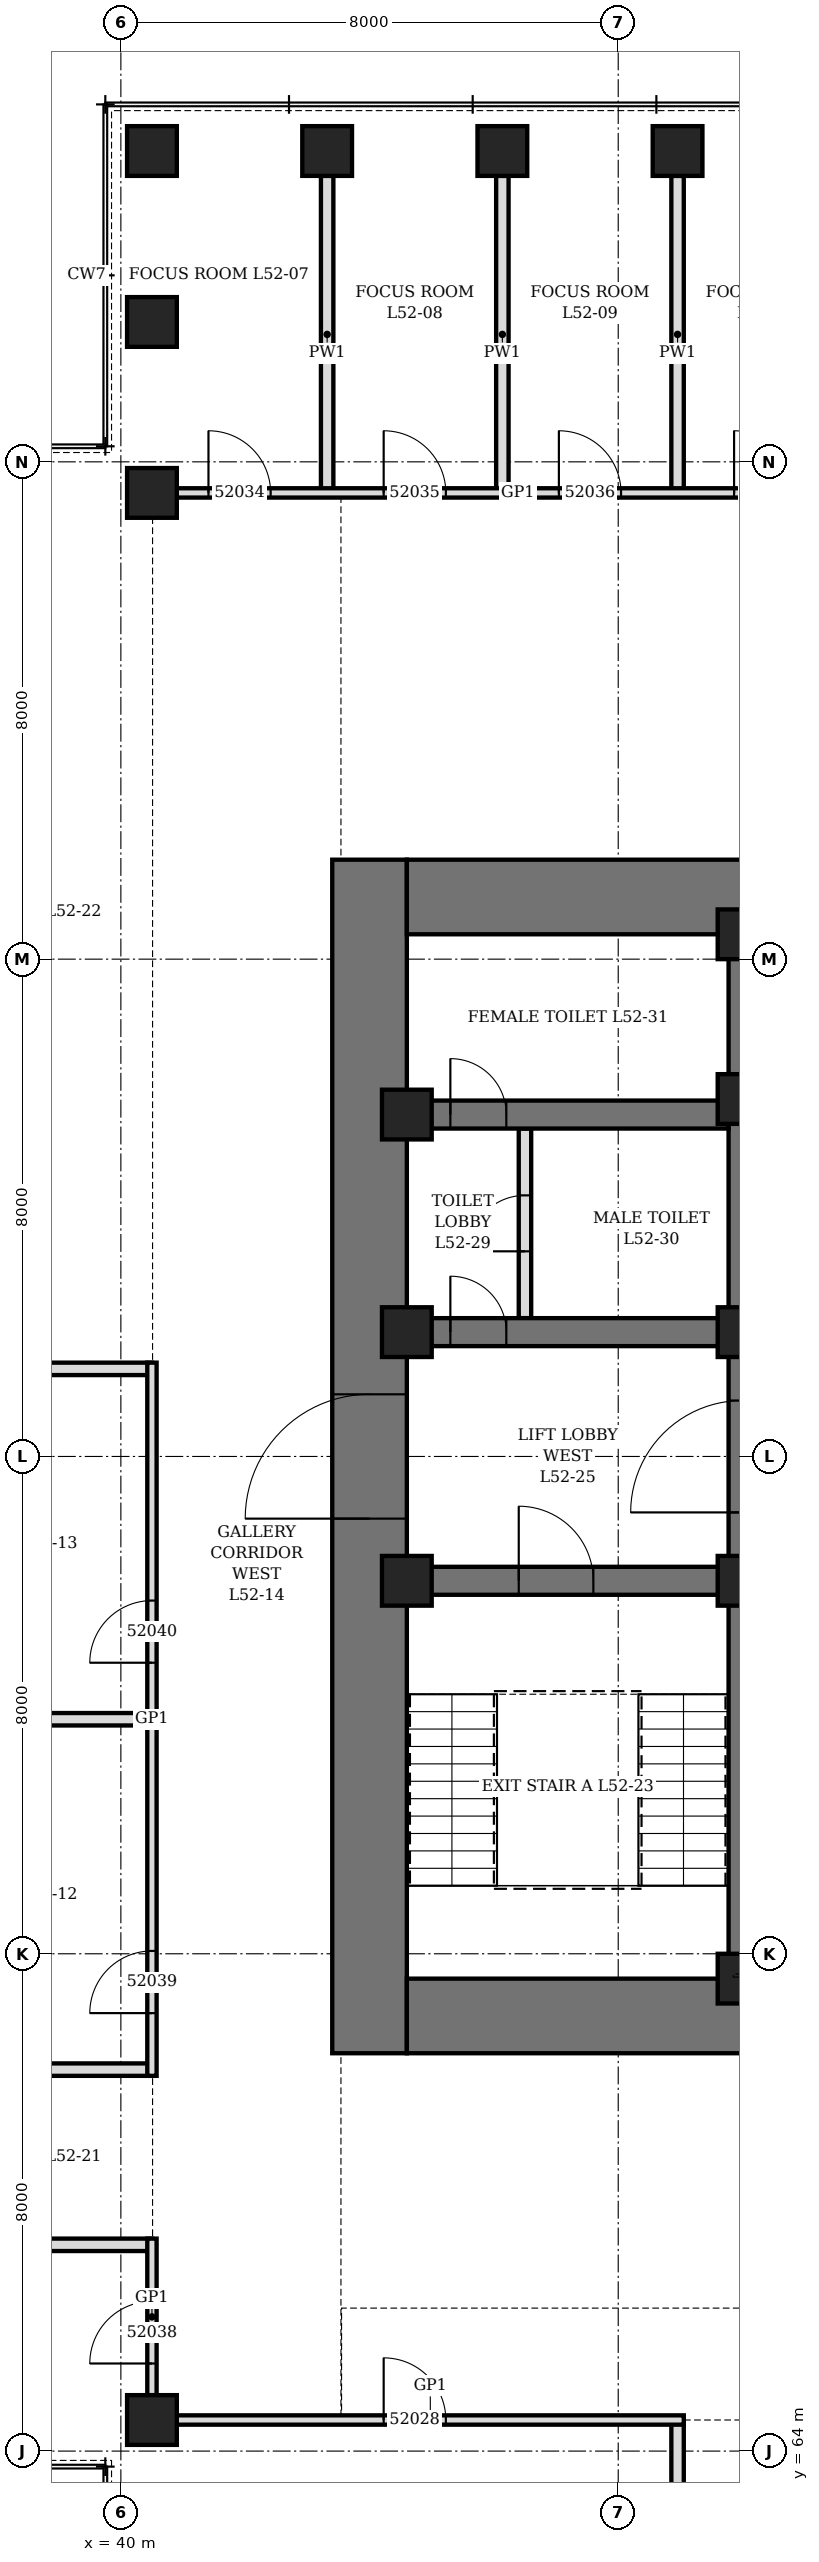
"""IFC4 building model, lengths in metres.
Left out: names, types, materials, properties, quantities, classifications, styles, units other than length and angle.
Written with IfcOpenShell. Run it as: python <this file> out.ifc"""

import sys

from ifc_helpers import new_model, si_unit, direction, frame, frame_2d, origin, origin_2d, place, context, subcontext, project, spatial, rectangle, hollow_rectangle, extrude, element, fill, save


model = new_model("IFC4")
c1 = context("Model", 3, precision=1e-05, world=origin(), true_north=direction((0.0, 1.0)))
c2 = subcontext(c1, "Body", "Model", "MODEL_VIEW")
j1 = project(units=[si_unit("LENGTHUNIT", "METRE"), si_unit("PLANEANGLEUNIT", "RADIAN")], contexts=[c1])
p1 = place(None, origin())
s1 = spatial("IfcSite", under=j1, at=p1, CompositionType="ELEMENT")
p2 = place(p1, origin())
s2 = spatial("IfcBuilding", under=s1, at=p2, CompositionType="ELEMENT")
p3 = place(p2, frame((0.0, 0.0, 231.7)))
s3 = spatial("IfcBuildingStorey", under=s2, at=p3, CompositionType="ELEMENT", Elevation=231.7)
for number, where, z_axis, x_axis in (
    (1, (48.955, 101.0, 0.0), (0.0, 0.0, 1.0), (1.0, 0.0, 0.0)),
    (2, (46.136, 101.0, 0.0), (0.0, 0.0, 1.0), (1.0, 0.0, 0.0)),
    (3, (43.318, 101.0, 0.0), (0.0, 0.0, 1.0), (1.0, 0.0, 0.0)),
    (4, (40.5, 101.0, 0.0), (0.0, 0.0, 1.0), (0.0, 1.0, 0.0)),
    (5, (40.5, 98.25, 0.0), (0.0, 0.0, 1.0), (0.0, 1.0, 0.0)),
    (6, (40.5, 95.5, 0.0), (0.0, 0.0, 1.0), (1.0, 0.0, 0.0)),
    (7, (40.5, 64.5, 0.0), (0.0, 0.0, 1.0), (0.0, 1.0, 0.0)),
):
    element("IfcColumn", number, at=place(p3, frame(where, z_axis=z_axis, x_axis=x_axis)), inside=s3, PredefinedType="COLUMN", context=c2, shape_type="SweptSolid", body=[
        extrude(hollow_rectangle(XDim=0.8, YDim=0.8, WallThickness=0.08, at=origin_2d()), origin(), (0.0, 0.0, 1.0), 4.2),
    ])
p4 = place(p3, frame((44.0, 70.4, 0.0), z_axis=(0.0, 0.0, 1.0), x_axis=(0.0, 1.0, 0.0)))
e8 = element("IfcWall", 8, at=p4, inside=s3, PredefinedType="SHEAR", context=c2, shape_type="SweptSolid", body=[
    extrude(rectangle(XDim=19.2, YDim=1.2, at=frame_2d((9.6, 0.0))), origin(), (0.0, 0.0, 1.0), 4.2),
])
p5 = place(p4, frame((8.6, 0.0, 0.0)))
e9 = element("IfcOpeningElement", 9, at=p5, cuts=e8, PredefinedType="OPENING", context=c2, shape_type="SweptSolid", body=[
    extrude(rectangle(XDim=2.0, YDim=2.4, at=frame_2d((1.0, 1.2))), frame((0.0, 0.61, 0.0), z_axis=(0.0, -1.0, 0.0), x_axis=(1.0, 0.0, 0.0)), (0.0, 0.0, 1.0), 1.22),
])
p6 = place(p3, frame((44.6, 71.0, 0.0), z_axis=(0.0, 0.0, 1.0), x_axis=(1.0, 0.0, 0.0)))
e10 = element("IfcWall", 10, at=p6, inside=s3, PredefinedType="SHEAR", context=c2, shape_type="SweptSolid", body=[
    extrude(rectangle(XDim=22.8, YDim=1.2, at=frame_2d((11.4, 0.0))), origin(), (0.0, 0.0, 1.0), 4.2),
])
p7 = place(p6, frame((6.35, 0.0, 0.0)))
e11 = element("IfcOpeningElement", 11, at=p7, cuts=e10, PredefinedType="OPENING", context=c2, shape_type="SweptSolid", body=[
    extrude(rectangle(XDim=1.1, YDim=2.2, at=frame_2d((0.55, 1.1))), frame((0.0, 0.61, 0.0), z_axis=(0.0, -1.0, 0.0), x_axis=(1.0, 0.0, 0.0)), (0.0, 0.0, 1.0), 1.22),
])
p8 = place(p6, frame((9.35, 0.0, 0.0)))
e12 = element("IfcOpeningElement", 12, at=p8, cuts=e10, PredefinedType="OPENING", context=c2, shape_type="SweptSolid", body=[
    extrude(rectangle(XDim=1.1, YDim=2.2, at=frame_2d((0.55, 1.1))), frame((0.0, 0.61, 0.0), z_axis=(0.0, -1.0, 0.0), x_axis=(1.0, 0.0, 0.0)), (0.0, 0.0, 1.0), 1.22),
])
p9 = place(p6, frame((12.35, 0.0, 0.0)))
e13 = element("IfcOpeningElement", 13, at=p9, cuts=e10, PredefinedType="OPENING", context=c2, shape_type="SweptSolid", body=[
    extrude(rectangle(XDim=1.1, YDim=2.2, at=frame_2d((0.55, 1.1))), frame((0.0, 0.61, 0.0), z_axis=(0.0, -1.0, 0.0), x_axis=(1.0, 0.0, 0.0)), (0.0, 0.0, 1.0), 1.22),
])
p10 = place(p6, frame((15.35, 0.0, 0.0)))
e14 = element("IfcOpeningElement", 14, at=p10, cuts=e10, PredefinedType="OPENING", context=c2, shape_type="SweptSolid", body=[
    extrude(rectangle(XDim=1.1, YDim=2.2, at=frame_2d((0.55, 1.1))), frame((0.0, 0.61, 0.0), z_axis=(0.0, -1.0, 0.0), x_axis=(1.0, 0.0, 0.0)), (0.0, 0.0, 1.0), 1.22),
])
p11 = place(p3, frame((44.6, 89.0, 0.0), z_axis=(0.0, 0.0, 1.0), x_axis=(1.0, 0.0, 0.0)))
e15 = element("IfcWall", 15, at=p11, inside=s3, PredefinedType="SHEAR", context=c2, shape_type="SweptSolid", body=[
    extrude(rectangle(XDim=22.8, YDim=1.2, at=frame_2d((11.4, 0.0))), origin(), (0.0, 0.0, 1.0), 4.2),
])
p12 = place(p11, frame((7.9, 0.0, 0.0)))
e16 = element("IfcOpeningElement", 16, at=p12, cuts=e15, PredefinedType="OPENING", context=c2, shape_type="SweptSolid", body=[
    extrude(rectangle(XDim=1.0, YDim=2.1, at=frame_2d((0.5, 1.05))), frame((0.0, 0.61, 0.0), z_axis=(0.0, -1.0, 0.0), x_axis=(1.0, 0.0, 0.0)), (0.0, 0.0, 1.0), 1.22),
])
p13 = place(p11, frame((13.012, 0.0, 0.0)))
e17 = element("IfcOpeningElement", 17, at=p13, cuts=e15, PredefinedType="OPENING", context=c2, shape_type="SweptSolid", body=[
    extrude(rectangle(XDim=0.9, YDim=2.1, at=frame_2d((0.45, 1.05))), frame((0.0, 0.61, 0.0), z_axis=(0.0, -1.0, 0.0), x_axis=(1.0, 0.0, 0.0)), (0.0, 0.0, 1.0), 1.22),
])
p14 = place(p3, frame((50.0, 71.6, 0.0), z_axis=(0.0, 0.0, 1.0), x_axis=(0.0, 1.0, 0.0)))
e18 = element("IfcWall", 18, at=p14, inside=s3, PredefinedType="SHEAR", context=c2, shape_type="SweptSolid", body=[
    extrude(rectangle(XDim=16.8, YDim=0.45, at=frame_2d((8.4, 0.0))), origin(), (0.0, 0.0, 1.0), 4.2),
])
p15 = place(p14, frame((7.5, 0.0, 0.0)))
e19 = element("IfcOpeningElement", 19, at=p15, cuts=e18, PredefinedType="OPENING", context=c2, shape_type="SweptSolid", body=[
    extrude(rectangle(XDim=1.8, YDim=2.4, at=frame_2d((0.9, 1.2))), frame((0.0, 0.235, 0.0), z_axis=(0.0, -1.0, 0.0), x_axis=(1.0, 0.0, 0.0)), (0.0, 0.0, 1.0), 0.47),
])
p16 = place(p3, frame((44.6, 78.0, 0.0), z_axis=(0.0, 0.0, 1.0), x_axis=(1.0, 0.0, 0.0)))
e20 = element("IfcWall", 20, at=p16, inside=s3, PredefinedType="SHEAR", context=c2, shape_type="SweptSolid", body=[
    extrude(rectangle(XDim=5.175, YDim=0.45, at=frame_2d((2.587, 0.0))), origin(), (0.0, 0.0, 1.0), 4.2),
])
p17 = place(p16, frame((1.8, 0.0, 0.0)))
e21 = element("IfcOpeningElement", 21, at=p17, cuts=e20, PredefinedType="OPENING", context=c2, shape_type="SweptSolid", body=[
    extrude(rectangle(XDim=1.2, YDim=2.1, at=frame_2d((0.6, 1.05))), frame((0.0, 0.235, 0.0), z_axis=(0.0, -1.0, 0.0), x_axis=(1.0, 0.0, 0.0)), (0.0, 0.0, 1.0), 0.47),
])
p18 = place(p3, frame((44.6, 82.0, 0.0), z_axis=(0.0, 0.0, 1.0), x_axis=(1.0, 0.0, 0.0)))
e22 = element("IfcWall", 22, at=p18, inside=s3, PredefinedType="SHEAR", context=c2, shape_type="SweptSolid", body=[
    extrude(rectangle(XDim=5.175, YDim=0.45, at=frame_2d((2.587, 0.0))), origin(), (0.0, 0.0, 1.0), 4.2),
])
p19 = place(p18, frame((0.7, 0.0, 0.0)))
e23 = element("IfcOpeningElement", 23, at=p19, cuts=e22, PredefinedType="OPENING", context=c2, shape_type="SweptSolid", body=[
    extrude(rectangle(XDim=0.9, YDim=2.1, at=frame_2d((0.45, 1.05))), frame((0.0, 0.235, 0.0), z_axis=(0.0, -1.0, 0.0), x_axis=(1.0, 0.0, 0.0)), (0.0, 0.0, 1.0), 0.47),
])
p20 = place(p3, frame((44.6, 85.5, 0.0), z_axis=(0.0, 0.0, 1.0), x_axis=(1.0, 0.0, 0.0)))
e24 = element("IfcWall", 24, at=p20, inside=s3, PredefinedType="SHEAR", context=c2, shape_type="SweptSolid", body=[
    extrude(rectangle(XDim=5.175, YDim=0.45, at=frame_2d((2.587, 0.0))), origin(), (0.0, 0.0, 1.0), 4.2),
])
p21 = place(p20, frame((0.7, 0.0, 0.0)))
e25 = element("IfcOpeningElement", 25, at=p21, cuts=e24, PredefinedType="OPENING", context=c2, shape_type="SweptSolid", body=[
    extrude(rectangle(XDim=0.9, YDim=2.1, at=frame_2d((0.45, 1.05))), frame((0.0, 0.235, 0.0), z_axis=(0.0, -1.0, 0.0), x_axis=(1.0, 0.0, 0.0)), (0.0, 0.0, 1.0), 0.47),
])
for number, where, z_axis, x_axis in (
    (26, (44.6, 78.0, 0.0), (0.0, 0.0, 1.0), (1.0, 0.0, 0.0)),
    (27, (44.6, 82.0, 0.0), (0.0, 0.0, 1.0), (1.0, 0.0, 0.0)),
    (28, (44.6, 85.5, 0.0), (0.0, 0.0, 1.0), (1.0, 0.0, 0.0)),
    (29, (50.0, 71.6, 0.0), (0.0, 0.0, 1.0), (1.0, 0.0, 0.0)),
    (30, (50.0, 78.0, 0.0), (0.0, 0.0, 1.0), (1.0, 0.0, 0.0)),
    (31, (50.0, 82.0, 0.0), (0.0, 0.0, 1.0), (1.0, 0.0, 0.0)),
    (32, (50.0, 85.75, 0.0), (0.0, 0.0, 1.0), (1.0, 0.0, 0.0)),
    (33, (50.0, 88.4, 0.0), (0.0, 0.0, 1.0), (1.0, 0.0, 0.0)),
):
    element("IfcColumn", number, at=place(p3, frame(where, z_axis=z_axis, x_axis=x_axis)), inside=s3, PredefinedType="COLUMN", context=c2, shape_type="SweptSolid", body=[
        extrude(hollow_rectangle(XDim=0.8, YDim=0.8, WallThickness=0.1, at=origin_2d()), origin(), (0.0, 0.0, 1.0), 4.2),
    ])
p22 = place(p3, frame((46.5, 82.225, 0.0), z_axis=(0.0, 0.0, 1.0), x_axis=(0.0, 1.0, 0.0)))
e34 = element("IfcWall", 34, at=p22, inside=s3, PredefinedType="PARTITIONING", context=c2, shape_type="SweptSolid", body=[
    extrude(rectangle(XDim=3.05, YDim=0.2, at=frame_2d((1.525, 0.0))), origin(), (0.0, 0.0, 1.0), 4.04),
])
p23 = place(p22, frame((1.075, 0.0, 0.0)))
e35 = element("IfcOpeningElement", 35, at=p23, cuts=e34, PredefinedType="OPENING", context=c2, shape_type="SweptSolid", body=[
    extrude(rectangle(XDim=0.9, YDim=2.1, at=frame_2d((0.45, 1.05))), frame((0.0, 0.11, 0.0), z_axis=(0.0, -1.0, 0.0), x_axis=(1.0, 0.0, 0.0)), (0.0, 0.0, 1.0), 0.22),
])
for number, where, z_axis, x_axis in (
    (36, (48.955, 59.4, 0.0), (0.0, 0.0, 1.0), (0.0, 1.0, 0.0)),
    (37, (43.318, 95.5, 0.0), (0.0, 0.0, 1.0), (0.0, 1.0, 0.0)),
    (38, (46.136, 95.5, 0.0), (0.0, 0.0, 1.0), (0.0, 1.0, 0.0)),
    (39, (48.955, 95.5, 0.0), (0.0, 0.0, 1.0), (0.0, 1.0, 0.0)),
    (40, (35.4, 67.318, 0.0), (0.0, 0.0, 1.0), (1.0, 0.0, 0.0)),
    (41, (35.4, 70.136, 0.0), (0.0, 0.0, 1.0), (1.0, 0.0, 0.0)),
    (42, (35.4, 75.773, 0.0), (0.0, 0.0, 1.0), (1.0, 0.0, 0.0)),
    (43, (35.4, 81.409, 0.0), (0.0, 0.0, 1.0), (1.0, 0.0, 0.0)),
):
    element("IfcWall", number, at=place(p3, frame(where, z_axis=z_axis, x_axis=x_axis)), inside=s3, PredefinedType="PARTITIONING", context=c2, shape_type="SweptSolid", body=[
        extrude(rectangle(XDim=5.1, YDim=0.2, at=frame_2d((2.55, 0.0))), origin(), (0.0, 0.0, 1.0), 3.428),
    ])
p24 = place(p3, frame((40.9, 64.5, 0.0), z_axis=(0.0, 0.0, 1.0), x_axis=(1.0, 0.0, 0.0)))
e44 = element("IfcWall", 44, at=p24, inside=s3, PredefinedType="PARTITIONING", context=c2, shape_type="SweptSolid", body=[
    extrude(rectangle(XDim=8.155, YDim=0.15, at=frame_2d((4.077, 0.0))), origin(), (0.0, 0.0, 1.0), 4.04),
])
p25 = place(p24, frame((3.327, 0.0, 0.0)))
e45 = element("IfcOpeningElement", 45, at=p25, cuts=e44, PredefinedType="OPENING", context=c2, shape_type="SweptSolid", body=[
    extrude(rectangle(XDim=1.0, YDim=2.4, at=frame_2d((0.5, 1.2))), frame((0.0, 0.085, 0.0), z_axis=(0.0, -1.0, 0.0), x_axis=(1.0, 0.0, 0.0)), (0.0, 0.0, 1.0), 0.17),
])
p26 = place(p3, frame((40.9, 95.5, 0.0), z_axis=(0.0, 0.0, 1.0), x_axis=(1.0, 0.0, 0.0)))
e46 = element("IfcWall", 46, at=p26, inside=s3, PredefinedType="PARTITIONING", context=c2, shape_type="SweptSolid", body=[
    extrude(rectangle(XDim=10.973, YDim=0.15, at=frame_2d((5.486, 0.0))), origin(), (0.0, 0.0, 1.0), 4.04),
])
p27 = place(p26, frame((0.509, 0.0, 0.0)))
e47 = element("IfcOpeningElement", 47, at=p27, cuts=e46, PredefinedType="OPENING", context=c2, shape_type="SweptSolid", body=[
    extrude(rectangle(XDim=1.0, YDim=2.4, at=frame_2d((0.5, 1.2))), frame((0.0, 0.085, 0.0), z_axis=(0.0, -1.0, 0.0), x_axis=(1.0, 0.0, 0.0)), (0.0, 0.0, 1.0), 0.17),
])
p28 = place(p26, frame((3.327, 0.0, 0.0)))
e48 = element("IfcOpeningElement", 48, at=p28, cuts=e46, PredefinedType="OPENING", context=c2, shape_type="SweptSolid", body=[
    extrude(rectangle(XDim=1.0, YDim=2.4, at=frame_2d((0.5, 1.2))), frame((0.0, 0.085, 0.0), z_axis=(0.0, -1.0, 0.0), x_axis=(1.0, 0.0, 0.0)), (0.0, 0.0, 1.0), 0.17),
])
p29 = place(p26, frame((6.146, 0.0, 0.0)))
e49 = element("IfcOpeningElement", 49, at=p29, cuts=e46, PredefinedType="OPENING", context=c2, shape_type="SweptSolid", body=[
    extrude(rectangle(XDim=1.0, YDim=2.4, at=frame_2d((0.5, 1.2))), frame((0.0, 0.085, 0.0), z_axis=(0.0, -1.0, 0.0), x_axis=(1.0, 0.0, 0.0)), (0.0, 0.0, 1.0), 0.17),
])
p30 = place(p26, frame((8.964, 0.0, 0.0)))
e50 = element("IfcOpeningElement", 50, at=p30, cuts=e46, PredefinedType="OPENING", context=c2, shape_type="SweptSolid", body=[
    extrude(rectangle(XDim=1.0, YDim=2.4, at=frame_2d((0.5, 1.2))), frame((0.0, 0.085, 0.0), z_axis=(0.0, -1.0, 0.0), x_axis=(1.0, 0.0, 0.0)), (0.0, 0.0, 1.0), 0.17),
])
p31 = place(p3, frame((40.5, 64.9, 0.0), z_axis=(0.0, 0.0, 1.0), x_axis=(0.0, 1.0, 0.0)))
e51 = element("IfcWall", 51, at=p31, inside=s3, PredefinedType="PARTITIONING", context=c2, shape_type="SweptSolid", body=[
    extrude(rectangle(XDim=2.518, YDim=0.15, at=frame_2d((1.259, 0.0))), origin(), (0.0, 0.0, 1.0), 4.04),
])
p32 = place(p31, frame((0.509, 0.0, 0.0)))
e52 = element("IfcOpeningElement", 52, at=p32, cuts=e51, PredefinedType="OPENING", context=c2, shape_type="SweptSolid", body=[
    extrude(rectangle(XDim=1.0, YDim=2.4, at=frame_2d((0.5, 1.2))), frame((0.0, 0.085, 0.0), z_axis=(0.0, -1.0, 0.0), x_axis=(1.0, 0.0, 0.0)), (0.0, 0.0, 1.0), 0.17),
])
p33 = place(p3, frame((40.5, 70.036, 0.0), z_axis=(0.0, 0.0, 1.0), x_axis=(0.0, 1.0, 0.0)))
e53 = element("IfcWall", 53, at=p33, inside=s3, PredefinedType="PARTITIONING", context=c2, shape_type="SweptSolid", body=[
    extrude(rectangle(XDim=11.473, YDim=0.15, at=frame_2d((5.736, 0.0))), origin(), (0.0, 0.0, 1.0), 4.04),
])
p34 = place(p33, frame((1.009, 0.0, 0.0)))
e54 = element("IfcOpeningElement", 54, at=p34, cuts=e53, PredefinedType="OPENING", context=c2, shape_type="SweptSolid", body=[
    extrude(rectangle(XDim=1.0, YDim=2.1, at=frame_2d((0.5, 1.05))), frame((0.0, 0.085, 0.0), z_axis=(0.0, -1.0, 0.0), x_axis=(1.0, 0.0, 0.0)), (0.0, 0.0, 1.0), 0.17),
])
p35 = place(p33, frame((6.646, 0.0, 0.0)))
e55 = element("IfcOpeningElement", 55, at=p35, cuts=e53, PredefinedType="OPENING", context=c2, shape_type="SweptSolid", body=[
    extrude(rectangle(XDim=1.0, YDim=2.1, at=frame_2d((0.5, 1.05))), frame((0.0, 0.085, 0.0), z_axis=(0.0, -1.0, 0.0), x_axis=(1.0, 0.0, 0.0)), (0.0, 0.0, 1.0), 0.17),
])
p36 = place(p19, origin())
e56 = element("IfcDoor", 56, at=p36, inside=s3, OperationType="SINGLE_SWING_LEFT", PredefinedType="DOOR", context=c2, shape_type="SweptSolid", body=[
    extrude(rectangle(XDim=0.9, YDim=2.1, at=frame_2d((0.45, 1.05))), frame((0.0, 0.225, 0.0), z_axis=(0.0, -1.0, 0.0), x_axis=(1.0, 0.0, 0.0)), (0.0, 0.0, 1.0), 0.449),
])
fill(e23, e56)
p37 = place(p23, origin())
e57 = element("IfcDoor", 57, at=p37, inside=s3, OperationType="SINGLE_SWING_RIGHT", PredefinedType="DOOR", context=c2, shape_type="SweptSolid", body=[
    extrude(rectangle(XDim=0.9, YDim=2.1, at=frame_2d((0.45, 1.05))), frame((0.0, 0.1, 0.0), z_axis=(0.0, -1.0, 0.0), x_axis=(1.0, 0.0, 0.0)), (0.0, 0.0, 1.0), 0.199),
])
fill(e35, e57)
p38 = place(p21, origin())
e58 = element("IfcDoor", 58, at=p38, inside=s3, OperationType="SINGLE_SWING_RIGHT", PredefinedType="DOOR", context=c2, shape_type="SweptSolid", body=[
    extrude(rectangle(XDim=0.9, YDim=2.1, at=frame_2d((0.45, 1.05))), frame((0.0, 0.225, 0.0), z_axis=(0.0, -1.0, 0.0), x_axis=(1.0, 0.0, 0.0)), (0.0, 0.0, 1.0), 0.449),
])
fill(e25, e58)
p39 = place(p17, origin())
e59 = element("IfcDoor", 59, at=p39, inside=s3, OperationType="SINGLE_SWING_LEFT", PredefinedType="DOOR", context=c2, shape_type="SweptSolid", body=[
    extrude(rectangle(XDim=1.2, YDim=2.1, at=frame_2d((0.6, 1.05))), frame((0.0, 0.225, 0.0), z_axis=(0.0, -1.0, 0.0), x_axis=(1.0, 0.0, 0.0)), (0.0, 0.0, 1.0), 0.449),
])
fill(e21, e59)
p40 = place(p5, origin())
e60 = element("IfcDoor", 60, at=p40, inside=s3, OperationType="DOUBLE_DOOR_SINGLE_SWING", PredefinedType="DOOR", context=c2, shape_type="SweptSolid", body=[
    extrude(rectangle(XDim=2.0, YDim=2.4, at=frame_2d((1.0, 1.2))), frame((0.0, 0.35, 0.0), z_axis=(0.0, -1.0, 0.0), x_axis=(1.0, 0.0, 0.0)), (0.0, 0.0, 1.0), 0.7),
])
fill(e9, e60)
p41 = place(p15, origin())
e61 = element("IfcDoor", 61, at=p41, inside=s3, OperationType="DOUBLE_DOOR_SINGLE_SWING", PredefinedType="DOOR", context=c2, shape_type="SweptSolid", body=[
    extrude(rectangle(XDim=1.8, YDim=2.4, at=frame_2d((0.9, 1.2))), frame((0.0, 0.225, 0.0), z_axis=(0.0, -1.0, 0.0), x_axis=(1.0, 0.0, 0.0)), (0.0, 0.0, 1.0), 0.449),
])
fill(e19, e61)
p42 = place(p25, origin())
e62 = element("IfcDoor", 62, at=p42, inside=s3, OperationType="SINGLE_SWING_RIGHT", PredefinedType="DOOR", context=c2, shape_type="SweptSolid", body=[
    extrude(rectangle(XDim=1.0, YDim=2.4, at=frame_2d((0.5, 1.2))), frame((0.0, 0.075, 0.0), z_axis=(0.0, -1.0, 0.0), x_axis=(1.0, 0.0, 0.0)), (0.0, 0.0, 1.0), 0.149),
])
fill(e45, e62)
p43 = place(p27, origin())
e63 = element("IfcDoor", 63, at=p43, inside=s3, OperationType="SINGLE_SWING_RIGHT", PredefinedType="DOOR", context=c2, shape_type="SweptSolid", body=[
    extrude(rectangle(XDim=1.0, YDim=2.4, at=frame_2d((0.5, 1.2))), frame((0.0, 0.075, 0.0), z_axis=(0.0, -1.0, 0.0), x_axis=(1.0, 0.0, 0.0)), (0.0, 0.0, 1.0), 0.149),
])
fill(e47, e63)
p44 = place(p28, origin())
e64 = element("IfcDoor", 64, at=p44, inside=s3, OperationType="SINGLE_SWING_RIGHT", PredefinedType="DOOR", context=c2, shape_type="SweptSolid", body=[
    extrude(rectangle(XDim=1.0, YDim=2.4, at=frame_2d((0.5, 1.2))), frame((0.0, 0.075, 0.0), z_axis=(0.0, -1.0, 0.0), x_axis=(1.0, 0.0, 0.0)), (0.0, 0.0, 1.0), 0.149),
])
fill(e48, e64)
p45 = place(p29, origin())
e65 = element("IfcDoor", 65, at=p45, inside=s3, OperationType="SINGLE_SWING_RIGHT", PredefinedType="DOOR", context=c2, shape_type="SweptSolid", body=[
    extrude(rectangle(XDim=1.0, YDim=2.4, at=frame_2d((0.5, 1.2))), frame((0.0, 0.075, 0.0), z_axis=(0.0, -1.0, 0.0), x_axis=(1.0, 0.0, 0.0)), (0.0, 0.0, 1.0), 0.149),
])
fill(e49, e65)
p46 = place(p30, origin())
e66 = element("IfcDoor", 66, at=p46, inside=s3, OperationType="SINGLE_SWING_RIGHT", PredefinedType="DOOR", context=c2, shape_type="SweptSolid", body=[
    extrude(rectangle(XDim=1.0, YDim=2.4, at=frame_2d((0.5, 1.2))), frame((0.0, 0.075, 0.0), z_axis=(0.0, -1.0, 0.0), x_axis=(1.0, 0.0, 0.0)), (0.0, 0.0, 1.0), 0.149),
])
fill(e50, e66)
p47 = place(p32, origin())
e67 = element("IfcDoor", 67, at=p47, inside=s3, OperationType="SINGLE_SWING_RIGHT", PredefinedType="DOOR", context=c2, shape_type="SweptSolid", body=[
    extrude(rectangle(XDim=1.0, YDim=2.4, at=frame_2d((0.5, 1.2))), frame((0.0, 0.075, 0.0), z_axis=(0.0, -1.0, 0.0), x_axis=(1.0, 0.0, 0.0)), (0.0, 0.0, 1.0), 0.149),
])
fill(e52, e67)
p48 = place(p34, origin())
e68 = element("IfcDoor", 68, at=p48, inside=s3, OperationType="SINGLE_SWING_LEFT", PredefinedType="DOOR", context=c2, shape_type="SweptSolid", body=[
    extrude(rectangle(XDim=1.0, YDim=2.1, at=frame_2d((0.5, 1.05))), frame((0.0, 0.075, 0.0), z_axis=(0.0, -1.0, 0.0), x_axis=(1.0, 0.0, 0.0)), (0.0, 0.0, 1.0), 0.149),
])
fill(e54, e68)
p49 = place(p35, origin())
e69 = element("IfcDoor", 69, at=p49, inside=s3, OperationType="SINGLE_SWING_LEFT", PredefinedType="DOOR", context=c2, shape_type="SweptSolid", body=[
    extrude(rectangle(XDim=1.0, YDim=2.1, at=frame_2d((0.5, 1.05))), frame((0.0, 0.075, 0.0), z_axis=(0.0, -1.0, 0.0), x_axis=(1.0, 0.0, 0.0)), (0.0, 0.0, 1.0), 0.149),
])
fill(e55, e69)
save(model, sys.argv[1])
